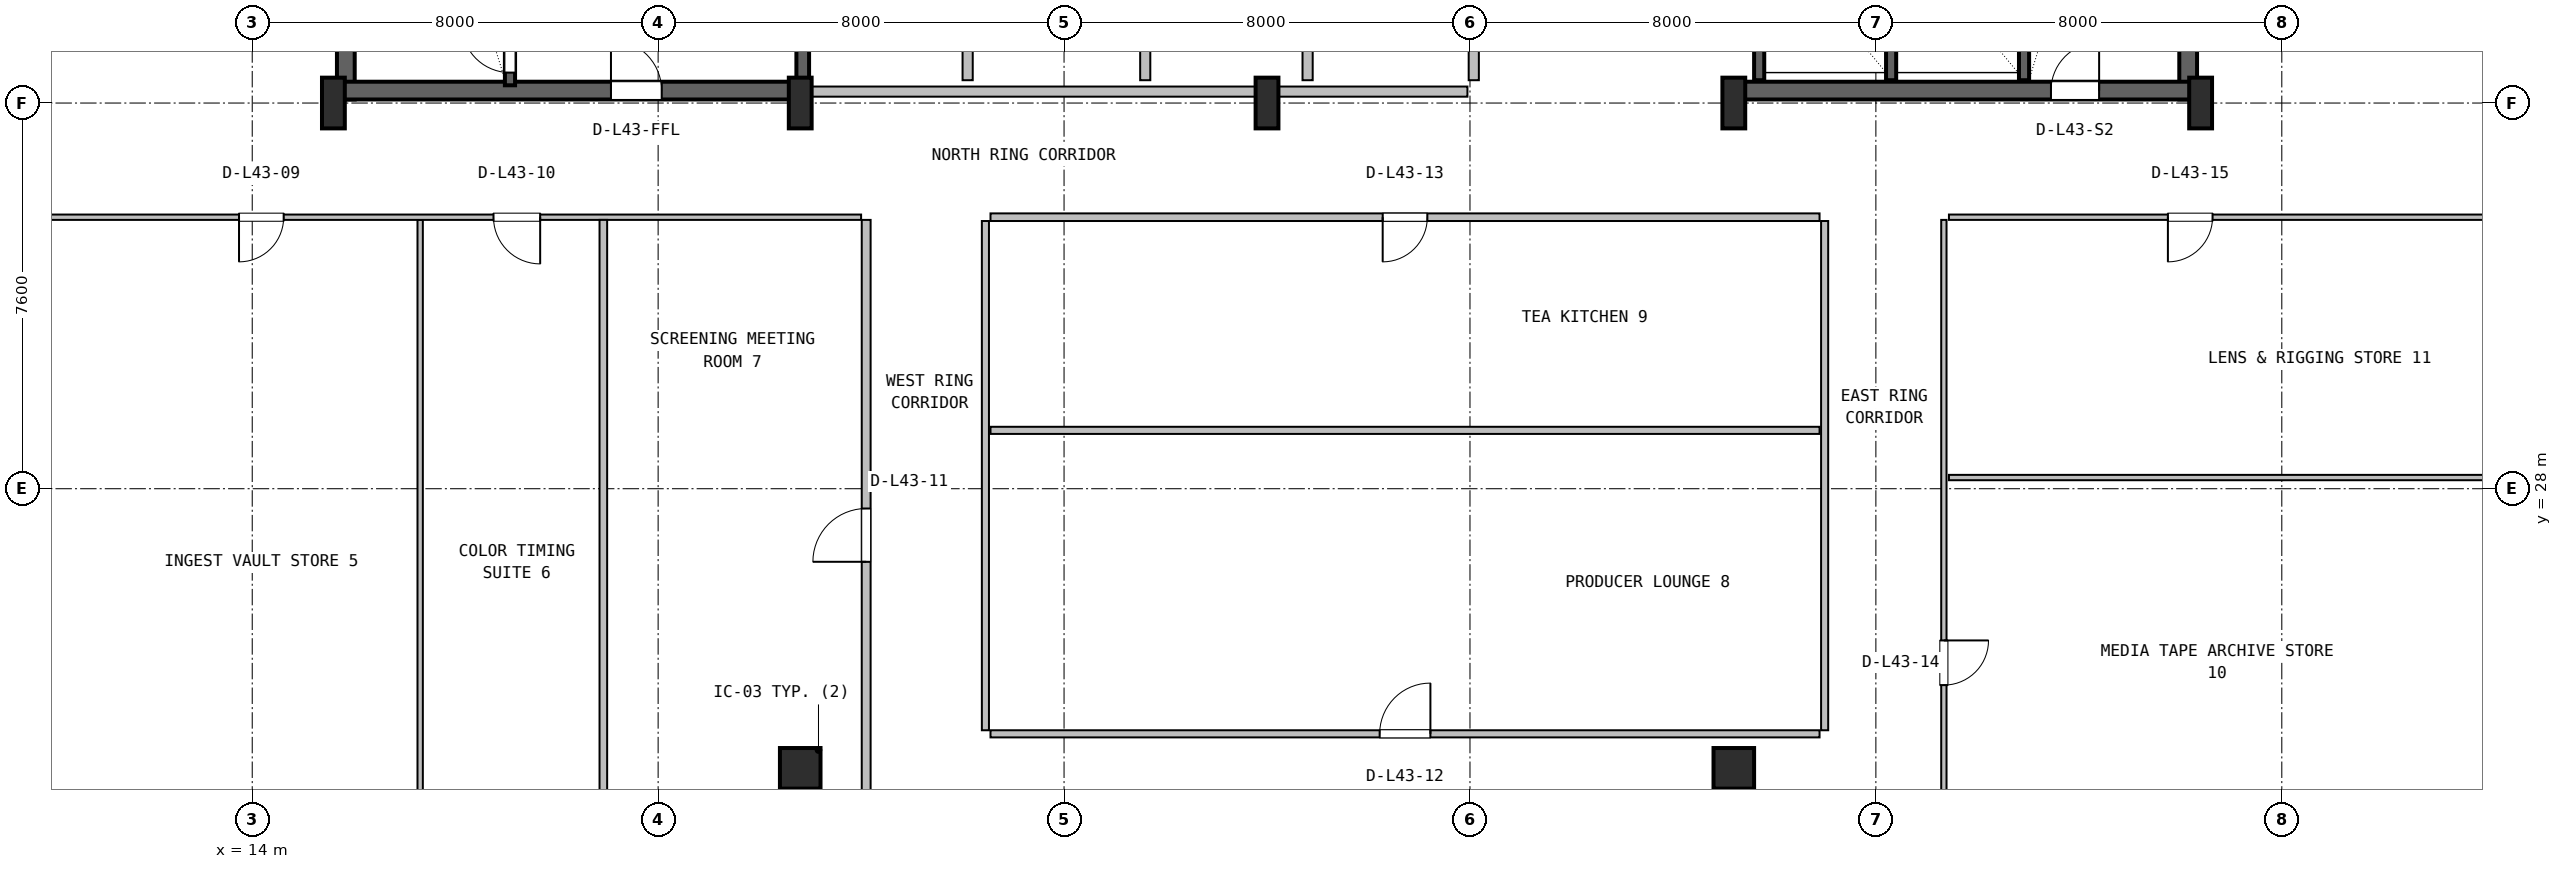
"""IFC4 building model, lengths in metres.
Left out: names, types, materials, properties, quantities, classifications, styles, units other than length and angle.
Written with IfcOpenShell. Run it as: python <this file> out.ifc"""

import sys

from ifc_helpers import new_model, si_unit, direction, frame, frame_2d, origin, origin_2d, place, context, subcontext, project, spatial, rectangle, i_section, extrude, source, transform, mapped, element, fill, save


model = new_model("IFC4")
c1 = context("Model", 3, precision=1e-05, world=origin(), true_north=direction((0.0, 1.0)))
c2 = subcontext(c1, "Body", "Model", "MODEL_VIEW")
j1 = project(units=[si_unit("LENGTHUNIT", "METRE"), si_unit("PLANEANGLEUNIT", "RADIAN")], contexts=[c1])
p1 = place(None, origin())
s1 = spatial("IfcSite", under=j1, at=p1, CompositionType="ELEMENT")
p2 = place(p1, origin())
s2 = spatial("IfcBuilding", under=s1, at=p2, CompositionType="ELEMENT")
p3 = place(p2, frame((0.0, 0.0, 176.2)))
s3 = spatial("IfcBuildingStorey", under=s2, at=p3, CompositionType="ELEMENT", Elevation=176.2)
for number, where, z_axis, x_axis in (
    (1, (15.845, 35.67, 0.0), (0.0, 0.0, 1.0), (0.0, 1.0, 0.0)),
    (2, (52.155, 35.67, 0.0), (0.0, 0.0, 1.0), (0.0, 1.0, 0.0)),
):
    element("IfcWall", number, at=place(p3, frame(where, z_axis=z_axis, x_axis=x_axis)), inside=s3, PredefinedType="SHEAR", context=c2, shape_type="SweptSolid", body=[
        extrude(rectangle(XDim=11.13, YDim=0.35, at=frame_2d((5.565, 0.0))), origin(), (0.0, 0.0, 1.0), 3.55),
    ])
p4 = place(p3, frame((15.67, 35.845, 0.0), z_axis=(0.0, 0.0, 1.0), x_axis=(1.0, 0.0, 0.0)))
e3 = element("IfcWall", 3, at=p4, inside=s3, PredefinedType="SHEAR", context=c2, shape_type="SweptSolid", body=[
    extrude(rectangle(XDim=9.13, YDim=0.35, at=frame_2d((4.565, 0.0))), origin(), (0.0, 0.0, 1.0), 3.55),
])
p5 = place(p4, frame((5.4, 0.0, 0.0)))
e4 = element("IfcOpeningElement", 4, at=p5, cuts=e3, PredefinedType="OPENING", context=c2, shape_type="SweptSolid", body=[
    extrude(rectangle(XDim=1.0, YDim=2.1, at=frame_2d((0.5, 1.05))), frame((0.0, 0.185, 0.0), z_axis=(0.0, -1.0, 0.0), x_axis=(1.0, 0.0, 0.0)), (0.0, 0.0, 1.0), 0.37),
])
p6 = place(p3, frame((43.2, 35.845, 0.0), z_axis=(0.0, 0.0, 1.0), x_axis=(1.0, 0.0, 0.0)))
e5 = element("IfcWall", 5, at=p6, inside=s3, PredefinedType="SHEAR", context=c2, shape_type="SweptSolid", body=[
    extrude(rectangle(XDim=9.13, YDim=0.35, at=frame_2d((4.565, 0.0))), origin(), (0.0, 0.0, 1.0), 3.55),
])
p7 = place(p6, frame((6.25, 0.0, 0.0)))
e6 = element("IfcOpeningElement", 6, at=p7, cuts=e5, PredefinedType="OPENING", context=c2, shape_type="SweptSolid", body=[
    extrude(rectangle(XDim=0.95, YDim=2.1, at=frame_2d((0.475, 1.05))), frame((0.0, 0.185, 0.0), z_axis=(0.0, -1.0, 0.0), x_axis=(1.0, 0.0, 0.0)), (0.0, 0.0, 1.0), 0.37),
])
m1 = source(origin(), c2, "Body", "SweptSolid", [
    extrude(i_section(OverallWidth=0.45, OverallDepth=1.0, WebThickness=0.016, FlangeThickness=0.03, FilletRadius=0.016, at=origin_2d()), origin(), (0.0, 0.0, 1.0), 3.8),
])
for number, where, z_axis, x_axis in (
    (7, (15.6, 35.6, 0.0), (0.0, 0.0, 1.0), (1.0, 0.0, 0.0)),
    (8, (24.8, 35.6, 0.0), (0.0, 0.0, 1.0), (1.0, 0.0, 0.0)),
    (9, (34.0, 35.6, 0.0), (0.0, 0.0, 1.0), (1.0, 0.0, 0.0)),
    (10, (43.2, 35.6, 0.0), (0.0, 0.0, 1.0), (1.0, 0.0, 0.0)),
    (11, (52.4, 35.6, 0.0), (0.0, 0.0, 1.0), (1.0, 0.0, 0.0)),
):
    element("IfcColumn", number, at=place(p3, frame(where, z_axis=z_axis, x_axis=x_axis)), inside=s3, PredefinedType="COLUMN", context=c2, shape_type="MappedRepresentation", body=[
        mapped(m1, transform((0.0, 0.0, 0.0), x_axis=(1.0, 0.0, 0.0), y_axis=(0.0, 1.0, 0.0), z_axis=(0.0, 0.0, 1.0), scale=1.0)),
    ])
m2 = source(origin(), c2, "Body", "SweptSolid", [
    extrude(rectangle(XDim=0.8, YDim=0.8, at=origin_2d()), origin(), (0.0, 0.0, 1.0), 3.8),
])
for number, where, z_axis, x_axis in (
    (12, (24.8, 22.49, 0.0), (0.0, 0.0, 1.0), (1.0, 0.0, 0.0)),
    (13, (43.2, 22.49, 0.0), (0.0, 0.0, 1.0), (1.0, 0.0, 0.0)),
):
    element("IfcColumn", number, at=place(p3, frame(where, z_axis=z_axis, x_axis=x_axis)), inside=s3, PredefinedType="COLUMN", context=c2, shape_type="MappedRepresentation", body=[
        mapped(m2, transform((0.0, 0.0, 0.0), x_axis=(1.0, 0.0, 0.0), y_axis=(0.0, 1.0, 0.0), z_axis=(0.0, 0.0, 1.0), scale=1.0)),
    ])
p8 = place(p3, frame((19.08, 35.95, 0.0), z_axis=(0.0, 0.0, 1.0), x_axis=(0.0, 1.0, 0.0)))
e14 = element("IfcWall", 14, at=p8, inside=s3, PredefinedType="SHEAR", context=c2, shape_type="SweptSolid", body=[
    extrude(rectangle(XDim=9.65, YDim=0.2, at=frame_2d((4.825, 0.0))), origin(), (0.0, 0.0, 1.0), 3.55),
])
p9 = place(p8, frame((0.25, 0.0, 0.0)))
e15 = element("IfcOpeningElement", 15, at=p9, cuts=e14, PredefinedType="OPENING", context=c2, shape_type="SweptSolid", body=[
    extrude(rectangle(XDim=0.95, YDim=2.1, at=frame_2d((0.475, 1.05))), frame((0.0, 0.11, 0.0), z_axis=(0.0, -1.0, 0.0), x_axis=(1.0, 0.0, 0.0)), (0.0, 0.0, 1.0), 0.22),
])
p10 = place(p3, frame((24.85, 36.05, 0.0), z_axis=(0.0, 0.0, 1.0), x_axis=(0.0, 1.0, 0.0)))
e16 = element("IfcWall", 16, at=p10, inside=s3, PredefinedType="SHEAR", context=c2, shape_type="SweptSolid", body=[
    extrude(rectangle(XDim=10.45, YDim=0.25, at=frame_2d((5.225, 0.0))), origin(), (0.0, 0.0, 1.0), 3.55),
])
p11 = place(p3, frame((48.92, 36.05, 0.0), z_axis=(0.0, 0.0, 1.0), x_axis=(0.0, 1.0, 0.0)))
e17 = element("IfcWall", 17, at=p11, inside=s3, PredefinedType="SHEAR", context=c2, shape_type="SweptSolid", body=[
    extrude(rectangle(XDim=10.5, YDim=0.2, at=frame_2d((5.25, 0.0))), origin(), (0.0, 0.0, 1.0), 3.55),
])
for number, where, z_axis, x_axis in (
    (18, (43.7, 36.05, 0.0), (0.0, 0.0, 1.0), (0.0, 1.0, 0.0)),
    (19, (46.3, 36.05, 0.0), (0.0, 0.0, 1.0), (0.0, 1.0, 0.0)),
):
    element("IfcWall", number, at=place(p3, frame(where, z_axis=z_axis, x_axis=x_axis)), inside=s3, PredefinedType="SHEAR", context=c2, shape_type="SweptSolid", body=[
        extrude(rectangle(XDim=3.05, YDim=0.2, at=frame_2d((1.525, 0.0))), origin(), (0.0, 0.0, 1.0), 3.55),
    ])
p12 = place(p3, frame((25.0, 35.825, 0.0), z_axis=(0.0, 0.0, 1.0), x_axis=(1.0, 0.0, 0.0)))
e20 = element("IfcWall", 20, at=p12, inside=s3, PredefinedType="SOLIDWALL", context=c2, shape_type="SweptSolid", body=[
    extrude(rectangle(XDim=12.95, YDim=0.2, at=frame_2d((6.475, 0.0))), origin(), (0.0, 0.0, 1.0), 2.575),
])
for number, where, z_axis, x_axis in (
    (21, (28.1, 36.05, 0.0), (0.0, 0.0, 1.0), (0.0, 1.0, 0.0)),
    (22, (31.6, 36.05, 0.0), (0.0, 0.0, 1.0), (0.0, 1.0, 0.0)),
):
    element("IfcWall", number, at=place(p3, frame(where, z_axis=z_axis, x_axis=x_axis)), inside=s3, PredefinedType="PLUMBINGWALL", context=c2, shape_type="SweptSolid", body=[
        extrude(rectangle(XDim=3.1, YDim=0.2, at=frame_2d((1.55, 0.0))), origin(), (0.0, 0.0, 1.0), 3.53),
    ])
for number, where, z_axis, x_axis in (
    (23, (34.8, 36.05, 0.0), (0.0, 0.0, 1.0), (0.0, 1.0, 0.0)),
    (24, (38.075, 36.05, 0.0), (0.0, 0.0, 1.0), (0.0, 1.0, 0.0)),
):
    element("IfcWall", number, at=place(p3, frame(where, z_axis=z_axis, x_axis=x_axis)), inside=s3, PredefinedType="SOLIDWALL", context=c2, shape_type="SweptSolid", body=[
        extrude(rectangle(XDim=3.1, YDim=0.2, at=frame_2d((1.55, 0.0))), origin(), (0.0, 0.0, 1.0), 3.53),
    ])
p13 = place(p3, frame((17.31, 20.89, 0.0), z_axis=(0.0, 0.0, 1.0), x_axis=(0.0, 1.0, 0.0)))
e25 = element("IfcWall", 25, at=p13, inside=s3, PredefinedType="PARTITIONING", context=c2, shape_type="SweptSolid", body=[
    extrude(rectangle(XDim=12.407, YDim=0.105, at=frame_2d((6.204, 0.0))), origin(), (0.0, 0.0, 1.0), 3.222),
])
p14 = place(p3, frame((7.18, 33.35, 0.0), z_axis=(0.0, 0.0, 1.0), x_axis=(1.0, 0.0, 0.0)))
e26 = element("IfcWall", 26, at=p14, inside=s3, PredefinedType="PARTITIONING", context=c2, shape_type="SweptSolid", body=[
    extrude(rectangle(XDim=18.82, YDim=0.105, at=frame_2d((9.41, 0.0))), origin(), (0.0, 0.0, 1.0), 2.909),
])
p15 = place(p14, frame((6.56, 0.0, 0.0)))
e27 = element("IfcOpeningElement", 27, at=p15, cuts=e26, PredefinedType="OPENING", context=c2, shape_type="SweptSolid", body=[
    extrude(rectangle(XDim=0.88, YDim=2.06, at=frame_2d((0.44, 1.03))), frame((0.0, 0.062, 0.0), z_axis=(0.0, -1.0, 0.0), x_axis=(1.0, 0.0, 0.0)), (0.0, 0.0, 1.0), 0.125),
])
p16 = place(p14, frame((11.575, 0.0, 0.0)))
e28 = element("IfcOpeningElement", 28, at=p16, cuts=e26, PredefinedType="OPENING", context=c2, shape_type="SweptSolid", body=[
    extrude(rectangle(XDim=0.92, YDim=2.08, at=frame_2d((0.46, 1.04))), frame((0.0, 0.062, 0.0), z_axis=(0.0, -1.0, 0.0), x_axis=(1.0, 0.0, 0.0)), (0.0, 0.0, 1.0), 0.125),
])
p17 = place(p3, frame((20.92, 20.89, 0.0), z_axis=(0.0, 0.0, 1.0), x_axis=(0.0, 1.0, 0.0)))
e29 = element("IfcWall", 29, at=p17, inside=s3, PredefinedType="PARTITIONING", context=c2, shape_type="SweptSolid", body=[
    extrude(rectangle(XDim=12.407, YDim=0.15, at=frame_2d((6.204, 0.0))), origin(), (0.0, 0.0, 1.0), 3.222),
])
p18 = place(p3, frame((26.1, 20.89, 0.0), z_axis=(0.0, 0.0, 1.0), x_axis=(0.0, 1.0, 0.0)))
e30 = element("IfcWall", 30, at=p18, inside=s3, PredefinedType="PARTITIONING", context=c2, shape_type="SweptSolid", body=[
    extrude(rectangle(XDim=12.407, YDim=0.175, at=frame_2d((6.204, 0.0))), origin(), (0.0, 0.0, 1.0), 2.909),
])
p19 = place(p18, frame((5.67, 0.0, 0.0)))
e31 = element("IfcOpeningElement", 31, at=p19, cuts=e30, PredefinedType="OPENING", context=c2, shape_type="SweptSolid", body=[
    extrude(rectangle(XDim=1.05, YDim=2.1, at=frame_2d((0.525, 1.05))), frame((0.0, 0.098, 0.0), z_axis=(0.0, -1.0, 0.0), x_axis=(1.0, 0.0, 0.0)), (0.0, 0.0, 1.0), 0.195),
])
p20 = place(p3, frame((28.55, 23.17, 0.0), z_axis=(0.0, 0.0, 1.0), x_axis=(1.0, 0.0, 0.0)))
e32 = element("IfcWall", 32, at=p20, inside=s3, PredefinedType="PARTITIONING", context=c2, shape_type="SweptSolid", body=[
    extrude(rectangle(XDim=16.34, YDim=0.14, at=frame_2d((8.17, 0.0))), origin(), (0.0, 0.0, 1.0), 2.909),
])
p21 = place(p20, frame((7.67, 0.0, 0.0)))
e33 = element("IfcOpeningElement", 33, at=p21, cuts=e32, PredefinedType="OPENING", context=c2, shape_type="SweptSolid", body=[
    extrude(rectangle(XDim=1.0, YDim=2.1, at=frame_2d((0.5, 1.05))), frame((0.0, 0.08, 0.0), z_axis=(0.0, -1.0, 0.0), x_axis=(1.0, 0.0, 0.0)), (0.0, 0.0, 1.0), 0.16),
])
p22 = place(p3, frame((44.99, 23.24, 0.0), z_axis=(0.0, 0.0, 1.0), x_axis=(0.0, 1.0, 0.0)))
e34 = element("IfcWall", 34, at=p22, inside=s3, PredefinedType="PARTITIONING", context=c2, shape_type="SweptSolid", body=[
    extrude(rectangle(XDim=10.035, YDim=0.14, at=frame_2d((5.018, 0.0))), origin(), (0.0, 0.0, 1.0), 3.222),
])
p23 = place(p3, frame((28.55, 29.15, 0.0), z_axis=(0.0, 0.0, 1.0), x_axis=(1.0, 0.0, 0.0)))
e35 = element("IfcWall", 35, at=p23, inside=s3, PredefinedType="PARTITIONING", context=c2, shape_type="SweptSolid", body=[
    extrude(rectangle(XDim=16.34, YDim=0.14, at=frame_2d((8.17, 0.0))), origin(), (0.0, 0.0, 1.0), 2.909),
])
p24 = place(p3, frame((28.45, 23.24, 0.0), z_axis=(0.0, 0.0, 1.0), x_axis=(0.0, 1.0, 0.0)))
e36 = element("IfcWall", 36, at=p24, inside=s3, PredefinedType="PARTITIONING", context=c2, shape_type="SweptSolid", body=[
    extrude(rectangle(XDim=10.035, YDim=0.14, at=frame_2d((5.018, 0.0))), origin(), (0.0, 0.0, 1.0), 3.222),
])
p25 = place(p3, frame((28.55, 33.35, 0.0), z_axis=(0.0, 0.0, 1.0), x_axis=(1.0, 0.0, 0.0)))
e37 = element("IfcWall", 37, at=p25, inside=s3, PredefinedType="PARTITIONING", context=c2, shape_type="SweptSolid", body=[
    extrude(rectangle(XDim=16.34, YDim=0.15, at=frame_2d((8.17, 0.0))), origin(), (0.0, 0.0, 1.0), 2.909),
])
p26 = place(p25, frame((7.73, 0.0, 0.0)))
e38 = element("IfcOpeningElement", 38, at=p26, cuts=e37, PredefinedType="OPENING", context=c2, shape_type="SweptSolid", body=[
    extrude(rectangle(XDim=0.88, YDim=2.06, at=frame_2d((0.44, 1.03))), frame((0.0, 0.085, 0.0), z_axis=(0.0, -1.0, 0.0), x_axis=(1.0, 0.0, 0.0)), (0.0, 0.0, 1.0), 0.17),
])
p27 = place(p3, frame((47.44, 28.22, 0.0), z_axis=(0.0, 0.0, 1.0), x_axis=(1.0, 0.0, 0.0)))
e39 = element("IfcWall", 39, at=p27, inside=s3, PredefinedType="PARTITIONING", context=c2, shape_type="SweptSolid", body=[
    extrude(rectangle(XDim=13.38, YDim=0.105, at=frame_2d((6.69, 0.0))), origin(), (0.0, 0.0, 1.0), 3.108),
])
p28 = place(p3, frame((47.34, 20.89, 0.0), z_axis=(0.0, 0.0, 1.0), x_axis=(0.0, 1.0, 0.0)))
e40 = element("IfcWall", 40, at=p28, inside=s3, PredefinedType="PARTITIONING", context=c2, shape_type="SweptSolid", body=[
    extrude(rectangle(XDim=12.407, YDim=0.105, at=frame_2d((6.204, 0.0))), origin(), (0.0, 0.0, 1.0), 3.222),
])
p29 = place(p28, frame((3.24, 0.0, 0.0)))
e41 = element("IfcOpeningElement", 41, at=p29, cuts=e40, PredefinedType="OPENING", context=c2, shape_type="SweptSolid", body=[
    extrude(rectangle(XDim=0.88, YDim=2.06, at=frame_2d((0.44, 1.03))), frame((0.0, 0.062, 0.0), z_axis=(0.0, -1.0, 0.0), x_axis=(1.0, 0.0, 0.0)), (0.0, 0.0, 1.0), 0.125),
])
p30 = place(p3, frame((47.44, 33.35, 0.0), z_axis=(0.0, 0.0, 1.0), x_axis=(1.0, 0.0, 0.0)))
e42 = element("IfcWall", 42, at=p30, inside=s3, PredefinedType="PARTITIONING", context=c2, shape_type="SweptSolid", body=[
    extrude(rectangle(XDim=13.38, YDim=0.105, at=frame_2d((6.69, 0.0))), origin(), (0.0, 0.0, 1.0), 3.108),
])
p31 = place(p30, frame((4.315, 0.0, 0.0)))
e43 = element("IfcOpeningElement", 43, at=p31, cuts=e42, PredefinedType="OPENING", context=c2, shape_type="SweptSolid", body=[
    extrude(rectangle(XDim=0.88, YDim=2.06, at=frame_2d((0.44, 1.03))), frame((0.0, 0.062, 0.0), z_axis=(0.0, -1.0, 0.0), x_axis=(1.0, 0.0, 0.0)), (0.0, 0.0, 1.0), 0.125),
])
m3 = source(origin(), c2, "Body", "SweptSolid", [
    extrude(rectangle(XDim=0.95, YDim=2.1, at=frame_2d((0.475, 1.05))), frame((0.0, 0.025, 0.0), z_axis=(0.0, -1.0, 0.0), x_axis=(1.0, 0.0, 0.0)), (0.0, 0.0, 1.0), 0.05),
])
p32 = place(p9, origin())
e44 = element("IfcDoor", 44, at=p32, inside=s3, OperationType="SINGLE_SWING_RIGHT", PredefinedType="DOOR", context=c2, shape_type="MappedRepresentation", body=[
    mapped(m3, transform((0.0, 0.0, 0.0), x_axis=(1.0, 0.0, 0.0), y_axis=(0.0, 1.0, 0.0), z_axis=(0.0, 0.0, 1.0), scale=1.0)),
])
fill(e15, e44)
m4 = source(origin(), c2, "Body", "SweptSolid", [
    extrude(rectangle(XDim=1.0, YDim=2.1, at=frame_2d((0.5, 1.05))), frame((0.0, 0.025, 0.0), z_axis=(0.0, -1.0, 0.0), x_axis=(1.0, 0.0, 0.0)), (0.0, 0.0, 1.0), 0.05),
])
p33 = place(p5, origin())
e45 = element("IfcDoor", 45, at=p33, inside=s3, OperationType="SINGLE_SWING_LEFT", PredefinedType="DOOR", context=c2, shape_type="MappedRepresentation", body=[
    mapped(m4, transform((0.0, 0.0, 0.0), x_axis=(1.0, 0.0, 0.0), y_axis=(0.0, 1.0, 0.0), z_axis=(0.0, 0.0, 1.0), scale=1.0)),
])
fill(e4, e45)
p34 = place(p7, origin())
e46 = element("IfcDoor", 46, at=p34, inside=s3, OperationType="SINGLE_SWING_RIGHT", PredefinedType="DOOR", context=c2, shape_type="MappedRepresentation", body=[
    mapped(m3, transform((0.0, 0.0, 0.0), x_axis=(1.0, 0.0, 0.0), y_axis=(0.0, 1.0, 0.0), z_axis=(0.0, 0.0, 1.0), scale=1.0)),
])
fill(e6, e46)
m5 = source(origin(), c2, "Body", "SweptSolid", [
    extrude(rectangle(XDim=0.88, YDim=2.06, at=frame_2d((0.44, 1.03))), frame((0.0, 0.025, 0.0), z_axis=(0.0, -1.0, 0.0), x_axis=(1.0, 0.0, 0.0)), (0.0, 0.0, 1.0), 0.05),
])
p35 = place(p15, frame((0.88, 0.0, 0.0), z_axis=(0.0, 0.0, 1.0), x_axis=(-1.0, 0.0, 0.0)))
e47 = element("IfcDoor", 47, at=p35, inside=s3, OperationType="SINGLE_SWING_LEFT", PredefinedType="DOOR", context=c2, shape_type="MappedRepresentation", body=[
    mapped(m5, transform((0.0, 0.0, 0.0), x_axis=(1.0, 0.0, 0.0), y_axis=(0.0, 1.0, 0.0), z_axis=(0.0, 0.0, 1.0), scale=1.0)),
])
fill(e27, e47)
m6 = source(origin(), c2, "Body", "SweptSolid", [
    extrude(rectangle(XDim=0.92, YDim=2.08, at=frame_2d((0.46, 1.04))), frame((0.0, 0.025, 0.0), z_axis=(0.0, -1.0, 0.0), x_axis=(1.0, 0.0, 0.0)), (0.0, 0.0, 1.0), 0.05),
])
p36 = place(p16, frame((0.92, 0.0, 0.0), z_axis=(0.0, 0.0, 1.0), x_axis=(-1.0, 0.0, 0.0)))
e48 = element("IfcDoor", 48, at=p36, inside=s3, OperationType="SINGLE_SWING_RIGHT", PredefinedType="DOOR", context=c2, shape_type="MappedRepresentation", body=[
    mapped(m6, transform((0.0, 0.0, 0.0), x_axis=(1.0, 0.0, 0.0), y_axis=(0.0, 1.0, 0.0), z_axis=(0.0, 0.0, 1.0), scale=1.0)),
])
fill(e28, e48)
m7 = source(origin(), c2, "Body", "SweptSolid", [
    extrude(rectangle(XDim=1.05, YDim=2.1, at=frame_2d((0.525, 1.05))), frame((0.0, 0.025, 0.0), z_axis=(0.0, -1.0, 0.0), x_axis=(1.0, 0.0, 0.0)), (0.0, 0.0, 1.0), 0.05),
])
p37 = place(p19, origin())
e49 = element("IfcDoor", 49, at=p37, inside=s3, OperationType="SINGLE_SWING_LEFT", PredefinedType="DOOR", context=c2, shape_type="MappedRepresentation", body=[
    mapped(m7, transform((0.0, 0.0, 0.0), x_axis=(1.0, 0.0, 0.0), y_axis=(0.0, 1.0, 0.0), z_axis=(0.0, 0.0, 1.0), scale=1.0)),
])
fill(e31, e49)
m8 = source(origin(), c2, "Body", "SweptSolid", [
    extrude(rectangle(XDim=1.0, YDim=2.1, at=frame_2d((0.5, 1.05))), frame((0.0, 0.025, 0.0), z_axis=(0.0, -1.0, 0.0), x_axis=(1.0, 0.0, 0.0)), (0.0, 0.0, 1.0), 0.05),
])
p38 = place(p21, origin())
e50 = element("IfcDoor", 50, at=p38, inside=s3, OperationType="SINGLE_SWING_RIGHT", PredefinedType="DOOR", context=c2, shape_type="MappedRepresentation", body=[
    mapped(m8, transform((0.0, 0.0, 0.0), x_axis=(1.0, 0.0, 0.0), y_axis=(0.0, 1.0, 0.0), z_axis=(0.0, 0.0, 1.0), scale=1.0)),
])
fill(e33, e50)
p39 = place(p26, frame((0.88, 0.0, 0.0), z_axis=(0.0, 0.0, 1.0), x_axis=(-1.0, 0.0, 0.0)))
e51 = element("IfcDoor", 51, at=p39, inside=s3, OperationType="SINGLE_SWING_LEFT", PredefinedType="DOOR", context=c2, shape_type="MappedRepresentation", body=[
    mapped(m5, transform((0.0, 0.0, 0.0), x_axis=(1.0, 0.0, 0.0), y_axis=(0.0, 1.0, 0.0), z_axis=(0.0, 0.0, 1.0), scale=1.0)),
])
fill(e38, e51)
p40 = place(p29, frame((0.88, 0.0, 0.0), z_axis=(0.0, 0.0, 1.0), x_axis=(-1.0, 0.0, 0.0)))
e52 = element("IfcDoor", 52, at=p40, inside=s3, OperationType="SINGLE_SWING_RIGHT", PredefinedType="DOOR", context=c2, shape_type="MappedRepresentation", body=[
    mapped(m5, transform((0.0, 0.0, 0.0), x_axis=(1.0, 0.0, 0.0), y_axis=(0.0, 1.0, 0.0), z_axis=(0.0, 0.0, 1.0), scale=1.0)),
])
fill(e41, e52)
p41 = place(p31, frame((0.88, 0.0, 0.0), z_axis=(0.0, 0.0, 1.0), x_axis=(-1.0, 0.0, 0.0)))
e53 = element("IfcDoor", 53, at=p41, inside=s3, OperationType="SINGLE_SWING_LEFT", PredefinedType="DOOR", context=c2, shape_type="MappedRepresentation", body=[
    mapped(m5, transform((0.0, 0.0, 0.0), x_axis=(1.0, 0.0, 0.0), y_axis=(0.0, 1.0, 0.0), z_axis=(0.0, 0.0, 1.0), scale=1.0)),
])
fill(e43, e53)
save(model, sys.argv[1])
